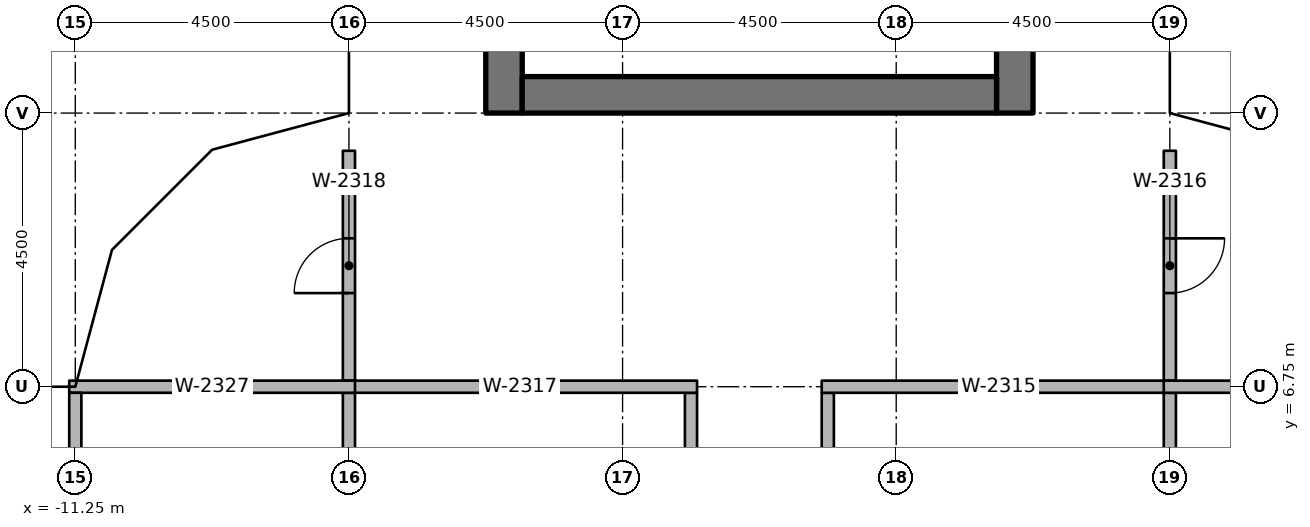
"""IFC4 building model, lengths in metres.
Left out: names, types, materials, properties, quantities, classifications, styles, units other than length and angle.
Written with IfcOpenShell. Run it as: python <this file> out.ifc"""

import sys

from ifc_helpers import new_model, si_unit, direction, frame, frame_2d, origin, origin_2d, place, context, subcontext, project, spatial, rectangle, extrude, element, fill, save


model = new_model("IFC4")
c1 = context("Model", 3, precision=1e-05, world=origin(), true_north=direction((0.0, 1.0)))
c2 = subcontext(c1, "Body", "Model", "MODEL_VIEW")
j1 = project(units=[si_unit("LENGTHUNIT", "METRE"), si_unit("PLANEANGLEUNIT", "RADIAN")], contexts=[c1])
p1 = place(None, origin())
s1 = spatial("IfcSite", under=j1, at=p1, CompositionType="ELEMENT")
p2 = place(p1, origin())
s2 = spatial("IfcBuilding", under=s1, at=p2, CompositionType="ELEMENT")
p3 = place(p2, frame((0.0, 0.0, 218.2)))
s3 = spatial("IfcBuildingStorey", under=s2, at=p3, CompositionType="ELEMENT", Elevation=218.2)
for number, where, z_axis, x_axis in (
    (1, (-10.75, 6.25, 0.0), (0.0, 0.0, 1.0), (1.0, 0.0, 0.0)),
    (2, (-6.25, 6.25, 0.0), (0.0, 0.0, 1.0), (1.0, 0.0, 0.0)),
    (3, (-6.25, 10.75, 0.0), (0.0, 0.0, 1.0), (1.0, 0.0, 0.0)),
    (4, (6.25, 6.25, 0.0), (0.0, 0.0, 1.0), (1.0, 0.0, 0.0)),
    (5, (6.25, 10.75, 0.0), (0.0, 0.0, 1.0), (1.0, 0.0, 0.0)),
):
    element("IfcColumn", number, at=place(p3, frame(where, z_axis=z_axis, x_axis=x_axis)), inside=s3, PredefinedType="COLUMN", context=c2, shape_type="SweptSolid", body=[
        extrude(rectangle(XDim=0.7, YDim=0.7, at=origin_2d()), origin(), (0.0, 0.0, 1.0), 3.65),
    ])
p4 = place(p3, frame((-4.2, 11.25, 0.0), z_axis=(0.0, 0.0, 1.0), x_axis=(0.0, 1.0, 0.0)))
e6 = element("IfcWall", 6, at=p4, inside=s3, PredefinedType="SHEAR", context=c2, shape_type="SweptSolid", body=[
    extrude(rectangle(XDim=15.0, YDim=0.6, at=frame_2d((7.5, 0.0))), origin(), (0.0, 0.0, 1.0), 3.8),
])
p5 = place(p4, frame((7.15, 0.0, 0.0)))
e7 = element("IfcOpeningElement", 7, at=p5, cuts=e6, PredefinedType="OPENING", context=c2, shape_type="SweptSolid", body=[
    extrude(rectangle(XDim=1.5, YDim=2.3, at=frame_2d((0.75, 1.15))), frame((0.0, 0.31, 0.0), z_axis=(0.0, -1.0, 0.0), x_axis=(1.0, 0.0, 0.0)), (0.0, 0.0, 1.0), 0.62),
])
p6 = place(p4, frame((13.9, 0.0, 0.0)))
e8 = element("IfcOpeningElement", 8, at=p6, cuts=e6, PredefinedType="OPENING", context=c2, shape_type="SweptSolid", body=[
    extrude(rectangle(XDim=0.9, YDim=2.1, at=frame_2d((0.45, 1.05))), frame((0.0, 0.31, 0.0), z_axis=(0.0, -1.0, 0.0), x_axis=(1.0, 0.0, 0.0)), (0.0, 0.0, 1.0), 0.62),
])
p7 = place(p4, frame((1.15, 0.0, 0.0)))
e9 = element("IfcOpeningElement", 9, at=p7, cuts=e6, PredefinedType="OPENING", context=c2, shape_type="SweptSolid", body=[
    extrude(rectangle(XDim=1.2, YDim=2.1, at=frame_2d((0.6, 1.05))), frame((0.0, 0.31, 0.0), z_axis=(0.0, -1.0, 0.0), x_axis=(1.0, 0.0, 0.0)), (0.0, 0.0, 1.0), 0.62),
])
p8 = place(p3, frame((4.2, 11.25, 0.0), z_axis=(0.0, 0.0, 1.0), x_axis=(0.0, 1.0, 0.0)))
e10 = element("IfcWall", 10, at=p8, inside=s3, PredefinedType="SHEAR", context=c2, shape_type="SweptSolid", body=[
    extrude(rectangle(XDim=15.0, YDim=0.6, at=frame_2d((7.5, 0.0))), origin(), (0.0, 0.0, 1.0), 3.8),
])
p9 = place(p8, frame((7.15, 0.0, 0.0)))
e11 = element("IfcOpeningElement", 11, at=p9, cuts=e10, PredefinedType="OPENING", context=c2, shape_type="SweptSolid", body=[
    extrude(rectangle(XDim=1.5, YDim=2.3, at=frame_2d((0.75, 1.15))), frame((0.0, 0.31, 0.0), z_axis=(0.0, -1.0, 0.0), x_axis=(1.0, 0.0, 0.0)), (0.0, 0.0, 1.0), 0.62),
])
p10 = place(p8, frame((5.55, 0.0, 0.0)))
e12 = element("IfcOpeningElement", 12, at=p10, cuts=e10, PredefinedType="OPENING", context=c2, shape_type="SweptSolid", body=[
    extrude(rectangle(XDim=1.2, YDim=2.1, at=frame_2d((0.6, 1.05))), frame((0.0, 0.31, 0.0), z_axis=(0.0, -1.0, 0.0), x_axis=(1.0, 0.0, 0.0)), (0.0, 0.0, 1.0), 0.62),
])
p11 = place(p3, frame((-3.9, 11.55, 0.0), z_axis=(0.0, 0.0, 1.0), x_axis=(1.0, 0.0, 0.0)))
e13 = element("IfcWall", 13, at=p11, inside=s3, PredefinedType="SHEAR", context=c2, shape_type="SweptSolid", body=[
    extrude(rectangle(XDim=7.8, YDim=0.6, at=frame_2d((3.9, 0.0))), origin(), (0.0, 0.0, 1.0), 3.8),
])
for number, where, z_axis, x_axis in (
    (14, (1.125, 0.1, 0.0), (0.0, 0.0, 1.0), (0.0, 1.0, 0.0)),
    (15, (-1.125, 0.1, 0.0), (0.0, 0.0, 1.0), (0.0, 1.0, 0.0)),
):
    element("IfcWall", number, at=place(p3, frame(where, z_axis=z_axis, x_axis=x_axis)), inside=s3, PredefinedType="PARTITIONING", context=c2, shape_type="SweptSolid", body=[
        extrude(rectangle(XDim=6.55, YDim=0.2, at=frame_2d((3.275, 0.0))), origin(), (0.0, 0.0, 1.0), 2.75),
    ])
p12 = place(p3, frame((1.025, 6.75, 0.0), z_axis=(0.0, 0.0, 1.0), x_axis=(1.0, 0.0, 0.0)))
e16 = element("IfcWall", 16, at=p12, inside=s3, PredefinedType="PARTITIONING", context=c2, shape_type="SweptSolid", body=[
    extrude(rectangle(XDim=5.825, YDim=0.2, at=frame_2d((2.913, 0.0))), origin(), (0.0, 0.0, 1.0), 2.75),
])
p13 = place(p3, frame((6.75, 10.63, 0.0), z_axis=(0.0, 0.0, 1.0), x_axis=(0.0, -1.0, 0.0)))
e17 = element("IfcWall", 17, at=p13, inside=s3, PredefinedType="PARTITIONING", context=c2, shape_type="SweptSolid", body=[
    extrude(rectangle(XDim=3.78, YDim=0.2, at=frame_2d((1.89, 0.0))), origin(), (0.0, 0.0, 1.0), 2.75),
])
p14 = place(p13, frame((1.44, 0.0, 0.0)))
e18 = element("IfcOpeningElement", 18, at=p14, cuts=e17, PredefinedType="OPENING", context=c2, shape_type="SweptSolid", body=[
    extrude(rectangle(XDim=0.9, YDim=2.1, at=frame_2d((0.45, 1.05))), frame((0.0, 0.11, 0.0), z_axis=(0.0, -1.0, 0.0), x_axis=(1.0, 0.0, 0.0)), (0.0, 0.0, 1.0), 0.22),
])
p15 = place(p3, frame((-6.85, 6.75, 0.0), z_axis=(0.0, 0.0, 1.0), x_axis=(1.0, 0.0, 0.0)))
e19 = element("IfcWall", 19, at=p15, inside=s3, PredefinedType="PARTITIONING", context=c2, shape_type="SweptSolid", body=[
    extrude(rectangle(XDim=5.825, YDim=0.2, at=frame_2d((2.913, 0.0))), origin(), (0.0, 0.0, 1.0), 2.75),
])
p16 = place(p3, frame((-6.75, 6.85, 0.0), z_axis=(0.0, 0.0, 1.0), x_axis=(0.0, 1.0, 0.0)))
e20 = element("IfcWall", 20, at=p16, inside=s3, PredefinedType="PARTITIONING", context=c2, shape_type="SweptSolid", body=[
    extrude(rectangle(XDim=3.78, YDim=0.2, at=frame_2d((1.89, 0.0))), origin(), (0.0, 0.0, 1.0), 2.75),
])
p17 = place(p16, frame((1.44, 0.0, 0.0)))
e21 = element("IfcOpeningElement", 21, at=p17, cuts=e20, PredefinedType="OPENING", context=c2, shape_type="SweptSolid", body=[
    extrude(rectangle(XDim=0.9, YDim=2.1, at=frame_2d((0.45, 1.05))), frame((0.0, 0.11, 0.0), z_axis=(0.0, -1.0, 0.0), x_axis=(1.0, 0.0, 0.0)), (0.0, 0.0, 1.0), 0.22),
])
p18 = place(p3, frame((6.75, 0.1, 0.0), z_axis=(0.0, 0.0, 1.0), x_axis=(0.0, 1.0, 0.0)))
e22 = element("IfcWall", 22, at=p18, inside=s3, PredefinedType="PARTITIONING", context=c2, shape_type="SweptSolid", body=[
    extrude(rectangle(XDim=6.55, YDim=0.2, at=frame_2d((3.275, 0.0))), origin(), (0.0, 0.0, 1.0), 2.75),
])
p19 = place(p3, frame((6.65, 6.75, 0.0), z_axis=(0.0, 0.0, 1.0), x_axis=(1.0, 0.0, 0.0)))
e23 = element("IfcWall", 23, at=p19, inside=s3, PredefinedType="PARTITIONING", context=c2, shape_type="SweptSolid", body=[
    extrude(rectangle(XDim=4.7, YDim=0.2, at=frame_2d((2.35, 0.0))), origin(), (0.0, 0.0, 1.0), 2.75),
])
p20 = place(p3, frame((-6.75, 0.1, 0.0), z_axis=(0.0, 0.0, 1.0), x_axis=(0.0, 1.0, 0.0)))
e24 = element("IfcWall", 24, at=p20, inside=s3, PredefinedType="PARTITIONING", context=c2, shape_type="SweptSolid", body=[
    extrude(rectangle(XDim=6.55, YDim=0.2, at=frame_2d((3.275, 0.0))), origin(), (0.0, 0.0, 1.0), 2.75),
])
p21 = place(p3, frame((-11.35, 6.75, 0.0), z_axis=(0.0, 0.0, 1.0), x_axis=(1.0, 0.0, 0.0)))
e25 = element("IfcWall", 25, at=p21, inside=s3, PredefinedType="PARTITIONING", context=c2, shape_type="SweptSolid", body=[
    extrude(rectangle(XDim=4.7, YDim=0.2, at=frame_2d((2.35, 0.0))), origin(), (0.0, 0.0, 1.0), 2.75),
])
p22 = place(p3, frame((-11.25, 0.1, 0.0), z_axis=(0.0, 0.0, 1.0), x_axis=(0.0, 1.0, 0.0)))
e26 = element("IfcWall", 26, at=p22, inside=s3, PredefinedType="PARTITIONING", context=c2, shape_type="SweptSolid", body=[
    extrude(rectangle(XDim=6.55, YDim=0.2, at=frame_2d((3.275, 0.0))), origin(), (0.0, 0.0, 1.0), 2.75),
])
p23 = place(p22, frame((2.375, 0.0, 0.0)))
e27 = element("IfcOpeningElement", 27, at=p23, cuts=e26, PredefinedType="OPENING", context=c2, shape_type="SweptSolid", body=[
    extrude(rectangle(XDim=1.8, YDim=2.1, at=frame_2d((0.9, 1.05))), frame((0.0, 0.11, 0.0), z_axis=(0.0, -1.0, 0.0), x_axis=(1.0, 0.0, 0.0)), (0.0, 0.0, 1.0), 0.22),
])
p24 = place(p14, origin())
e28 = element("IfcDoor", 28, at=p24, inside=s3, OperationType="SINGLE_SWING_RIGHT", PredefinedType="DOOR", context=c2, shape_type="SweptSolid", body=[
    extrude(rectangle(XDim=0.9, YDim=2.1, at=frame_2d((0.45, 1.05))), frame((0.0, 0.025, 0.0), z_axis=(0.0, -1.0, 0.0), x_axis=(1.0, 0.0, 0.0)), (0.0, 0.0, 1.0), 0.05),
])
fill(e18, e28)
p25 = place(p17, origin())
e29 = element("IfcDoor", 29, at=p25, inside=s3, OperationType="SINGLE_SWING_LEFT", PredefinedType="DOOR", context=c2, shape_type="SweptSolid", body=[
    extrude(rectangle(XDim=0.9, YDim=2.1, at=frame_2d((0.45, 1.05))), frame((0.0, 0.025, 0.0), z_axis=(0.0, -1.0, 0.0), x_axis=(1.0, 0.0, 0.0)), (0.0, 0.0, 1.0), 0.05),
])
fill(e21, e29)
save(model, sys.argv[1])
